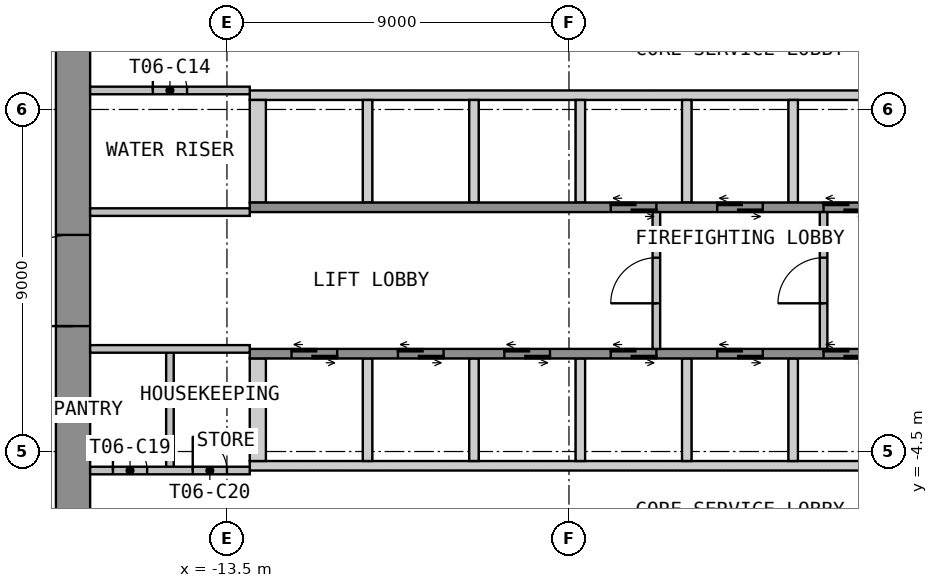
"""IFC4 building model, lengths in metres.
Left out: names, types, materials, properties, quantities, classifications, styles, units other than length and angle.
Written with IfcOpenShell. Run it as: python <this file> out.ifc"""

import sys

from ifc_helpers import new_model, si_unit, direction, frame, frame_2d, origin, place, context, subcontext, project, spatial, polyline, rectangle, outline, extrude, element, fill, save


model = new_model("IFC4")
c1 = context("Model", 3, precision=1e-05, world=origin(), true_north=direction((0.0, 1.0)))
c2 = subcontext(c1, "Body", "Model", "MODEL_VIEW")
j1 = project(units=[si_unit("LENGTHUNIT", "METRE"), si_unit("PLANEANGLEUNIT", "RADIAN")], contexts=[c1])
p1 = place(None, origin())
s1 = spatial("IfcSite", under=j1, at=p1, CompositionType="ELEMENT")
p2 = place(p1, origin())
s2 = spatial("IfcBuilding", under=s1, at=p2, CompositionType="ELEMENT")
p3 = place(p2, frame((0.0, 0.0, 93.0)))
s3 = spatial("IfcBuildingStorey", under=s2, at=p3, CompositionType="ELEMENT", Elevation=93.0)
p4 = place(p3, frame((-17.55, -12.6, 0.0), z_axis=(0.0, 0.0, 1.0), x_axis=(0.0, 1.0, 0.0)))
e1 = element("IfcWall", 1, at=p4, inside=s3, PredefinedType="SHEAR", context=c2, shape_type="SweptSolid", body=[
    extrude(rectangle(XDim=25.2, YDim=0.9, at=frame_2d((12.6, 0.0))), origin(), (0.0, 0.0, 1.0), 3.525),
])
p5 = place(p4, frame((11.4, 0.0, 0.0)))
e2 = element("IfcOpeningElement", 2, at=p5, cuts=e1, PredefinedType="OPENING", context=c2, shape_type="SweptSolid", body=[
    extrude(rectangle(XDim=2.4, YDim=2.1, at=frame_2d((1.2, 1.05))), frame((0.0, 0.46, 0.0), z_axis=(0.0, -1.0, 0.0), x_axis=(1.0, 0.0, 0.0)), (0.0, 0.0, 1.0), 0.92),
])
p6 = place(p3, origin())
e3 = element("IfcWall", 3, at=p6, inside=s3, PredefinedType="SHEAR", context=c2, shape_type="SweptSolid", body=[
    extrude(outline(polyline([(-12.9, 4.75), (12.9, 4.75), (12.9, 5.0), (-12.9, 5.0), (-12.9, 4.75)])), origin(), (0.0, 0.0, 1.0), 3.525),
])
p7 = place(p3, origin())
e4 = element("IfcWall", 4, at=p7, inside=s3, PredefinedType="SHEAR", context=c2, shape_type="SweptSolid", body=[
    extrude(outline(polyline([(-12.9, 2.05), (-12.475, 2.05), (-12.475, 4.75), (-12.9, 4.75), (-12.9, 2.05)])), origin(), (0.0, 0.0, 1.0), 3.525),
])
p8 = place(p3, origin())
e5 = element("IfcWall", 5, at=p8, inside=s3, PredefinedType="SHEAR", context=c2, shape_type="SweptSolid", body=[
    extrude(outline(polyline([(-9.925, 2.05), (-9.675, 2.05), (-9.675, 4.75), (-9.925, 4.75), (-9.925, 2.05)])), origin(), (0.0, 0.0, 1.0), 3.525),
])
p9 = place(p3, origin())
e6 = element("IfcWall", 6, at=p9, inside=s3, PredefinedType="SHEAR", context=c2, shape_type="SweptSolid", body=[
    extrude(outline(polyline([(-7.125, 2.05), (-6.875, 2.05), (-6.875, 4.75), (-7.125, 4.75), (-7.125, 2.05)])), origin(), (0.0, 0.0, 1.0), 3.525),
])
p10 = place(p3, origin())
e7 = element("IfcWall", 7, at=p10, inside=s3, PredefinedType="SHEAR", context=c2, shape_type="SweptSolid", body=[
    extrude(outline(polyline([(-4.325, 2.05), (-4.075, 2.05), (-4.075, 4.75), (-4.325, 4.75), (-4.325, 2.05)])), origin(), (0.0, 0.0, 1.0), 3.525),
])
p11 = place(p3, origin())
e8 = element("IfcWall", 8, at=p11, inside=s3, PredefinedType="SHEAR", context=c2, shape_type="SweptSolid", body=[
    extrude(outline(polyline([(-1.525, 2.05), (-1.275, 2.05), (-1.275, 4.75), (-1.525, 4.75), (-1.525, 2.05)])), origin(), (0.0, 0.0, 1.0), 3.525),
])
p12 = place(p3, origin())
e9 = element("IfcWall", 9, at=p12, inside=s3, PredefinedType="SHEAR", context=c2, shape_type="SweptSolid", body=[
    extrude(outline(polyline([(1.275, 2.05), (1.525, 2.05), (1.525, 4.75), (1.275, 4.75), (1.275, 2.05)])), origin(), (0.0, 0.0, 1.0), 3.525),
])
p13 = place(p3, frame((-12.9, 1.925, 0.0), z_axis=(0.0, 0.0, 1.0), x_axis=(1.0, 0.0, 0.0)))
e10 = element("IfcWall", 10, at=p13, inside=s3, PredefinedType="SHEAR", context=c2, shape_type="SweptSolid", body=[
    extrude(rectangle(XDim=25.8, YDim=0.25, at=frame_2d((12.9, 0.0))), origin(), (0.0, 0.0, 1.0), 3.525),
])
p14 = place(p13, frame((9.5, 0.0, 0.0)))
e11 = element("IfcOpeningElement", 11, at=p14, cuts=e10, PredefinedType="OPENING", context=c2, shape_type="SweptSolid", body=[
    extrude(rectangle(XDim=1.2, YDim=2.1, at=frame_2d((0.6, 1.05))), frame((0.0, 0.135, 0.0), z_axis=(0.0, -1.0, 0.0), x_axis=(1.0, 0.0, 0.0)), (0.0, 0.0, 1.0), 0.27),
])
p15 = place(p13, frame((12.3, 0.0, 0.0)))
e12 = element("IfcOpeningElement", 12, at=p15, cuts=e10, PredefinedType="OPENING", context=c2, shape_type="SweptSolid", body=[
    extrude(rectangle(XDim=1.2, YDim=2.1, at=frame_2d((0.6, 1.05))), frame((0.0, 0.135, 0.0), z_axis=(0.0, -1.0, 0.0), x_axis=(1.0, 0.0, 0.0)), (0.0, 0.0, 1.0), 0.27),
])
p16 = place(p13, frame((15.1, 0.0, 0.0)))
e13 = element("IfcOpeningElement", 13, at=p16, cuts=e10, PredefinedType="OPENING", context=c2, shape_type="SweptSolid", body=[
    extrude(rectangle(XDim=1.2, YDim=2.1, at=frame_2d((0.6, 1.05))), frame((0.0, 0.135, 0.0), z_axis=(0.0, -1.0, 0.0), x_axis=(1.0, 0.0, 0.0)), (0.0, 0.0, 1.0), 0.27),
])
p17 = place(p13, frame((17.9, 0.0, 0.0)))
e14 = element("IfcOpeningElement", 14, at=p17, cuts=e10, PredefinedType="OPENING", context=c2, shape_type="SweptSolid", body=[
    extrude(rectangle(XDim=1.2, YDim=2.1, at=frame_2d((0.6, 1.05))), frame((0.0, 0.135, 0.0), z_axis=(0.0, -1.0, 0.0), x_axis=(1.0, 0.0, 0.0)), (0.0, 0.0, 1.0), 0.27),
])
p18 = place(p13, frame((20.7, 0.0, 0.0)))
e15 = element("IfcOpeningElement", 15, at=p18, cuts=e10, PredefinedType="OPENING", context=c2, shape_type="SweptSolid", body=[
    extrude(rectangle(XDim=1.2, YDim=2.1, at=frame_2d((0.6, 1.05))), frame((0.0, 0.135, 0.0), z_axis=(0.0, -1.0, 0.0), x_axis=(1.0, 0.0, 0.0)), (0.0, 0.0, 1.0), 0.27),
])
p19 = place(p13, frame((23.5, 0.0, 0.0)))
e16 = element("IfcOpeningElement", 16, at=p19, cuts=e10, PredefinedType="OPENING", context=c2, shape_type="SweptSolid", body=[
    extrude(rectangle(XDim=1.2, YDim=2.1, at=frame_2d((0.6, 1.05))), frame((0.0, 0.135, 0.0), z_axis=(0.0, -1.0, 0.0), x_axis=(1.0, 0.0, 0.0)), (0.0, 0.0, 1.0), 0.27),
])
p20 = place(p3, origin())
e17 = element("IfcWall", 17, at=p20, inside=s3, PredefinedType="SHEAR", context=c2, shape_type="SweptSolid", body=[
    extrude(outline(polyline([(-12.9, -5.0), (12.9, -5.0), (12.9, -4.75), (-12.9, -4.75), (-12.9, -5.0)])), origin(), (0.0, 0.0, 1.0), 3.525),
])
p21 = place(p3, origin())
e18 = element("IfcWall", 18, at=p21, inside=s3, PredefinedType="SHEAR", context=c2, shape_type="SweptSolid", body=[
    extrude(outline(polyline([(-12.9, -4.75), (-12.475, -4.75), (-12.475, -2.05), (-12.9, -2.05), (-12.9, -4.75)])), origin(), (0.0, 0.0, 1.0), 3.525),
])
p22 = place(p3, origin())
e19 = element("IfcWall", 19, at=p22, inside=s3, PredefinedType="SHEAR", context=c2, shape_type="SweptSolid", body=[
    extrude(outline(polyline([(-9.925, -4.75), (-9.675, -4.75), (-9.675, -2.05), (-9.925, -2.05), (-9.925, -4.75)])), origin(), (0.0, 0.0, 1.0), 3.525),
])
p23 = place(p3, origin())
e20 = element("IfcWall", 20, at=p23, inside=s3, PredefinedType="SHEAR", context=c2, shape_type="SweptSolid", body=[
    extrude(outline(polyline([(-7.125, -4.75), (-6.875, -4.75), (-6.875, -2.05), (-7.125, -2.05), (-7.125, -4.75)])), origin(), (0.0, 0.0, 1.0), 3.525),
])
p24 = place(p3, origin())
e21 = element("IfcWall", 21, at=p24, inside=s3, PredefinedType="SHEAR", context=c2, shape_type="SweptSolid", body=[
    extrude(outline(polyline([(-4.325, -4.75), (-4.075, -4.75), (-4.075, -2.05), (-4.325, -2.05), (-4.325, -4.75)])), origin(), (0.0, 0.0, 1.0), 3.525),
])
p25 = place(p3, origin())
e22 = element("IfcWall", 22, at=p25, inside=s3, PredefinedType="SHEAR", context=c2, shape_type="SweptSolid", body=[
    extrude(outline(polyline([(-1.525, -4.75), (-1.275, -4.75), (-1.275, -2.05), (-1.525, -2.05), (-1.525, -4.75)])), origin(), (0.0, 0.0, 1.0), 3.525),
])
p26 = place(p3, origin())
e23 = element("IfcWall", 23, at=p26, inside=s3, PredefinedType="SHEAR", context=c2, shape_type="SweptSolid", body=[
    extrude(outline(polyline([(1.275, -4.75), (1.525, -4.75), (1.525, -2.05), (1.275, -2.05), (1.275, -4.75)])), origin(), (0.0, 0.0, 1.0), 3.525),
])
p27 = place(p3, frame((-12.9, -1.925, 0.0), z_axis=(0.0, 0.0, 1.0), x_axis=(1.0, 0.0, 0.0)))
e24 = element("IfcWall", 24, at=p27, inside=s3, PredefinedType="SHEAR", context=c2, shape_type="SweptSolid", body=[
    extrude(rectangle(XDim=25.8, YDim=0.25, at=frame_2d((12.9, 0.0))), origin(), (0.0, 0.0, 1.0), 3.525),
])
p28 = place(p27, frame((1.1, 0.0, 0.0)))
e25 = element("IfcOpeningElement", 25, at=p28, cuts=e24, PredefinedType="OPENING", context=c2, shape_type="SweptSolid", body=[
    extrude(rectangle(XDim=1.2, YDim=2.1, at=frame_2d((0.6, 1.05))), frame((0.0, 0.135, 0.0), z_axis=(0.0, -1.0, 0.0), x_axis=(1.0, 0.0, 0.0)), (0.0, 0.0, 1.0), 0.27),
])
p29 = place(p27, frame((3.9, 0.0, 0.0)))
e26 = element("IfcOpeningElement", 26, at=p29, cuts=e24, PredefinedType="OPENING", context=c2, shape_type="SweptSolid", body=[
    extrude(rectangle(XDim=1.2, YDim=2.1, at=frame_2d((0.6, 1.05))), frame((0.0, 0.135, 0.0), z_axis=(0.0, -1.0, 0.0), x_axis=(1.0, 0.0, 0.0)), (0.0, 0.0, 1.0), 0.27),
])
p30 = place(p27, frame((6.7, 0.0, 0.0)))
e27 = element("IfcOpeningElement", 27, at=p30, cuts=e24, PredefinedType="OPENING", context=c2, shape_type="SweptSolid", body=[
    extrude(rectangle(XDim=1.2, YDim=2.1, at=frame_2d((0.6, 1.05))), frame((0.0, 0.135, 0.0), z_axis=(0.0, -1.0, 0.0), x_axis=(1.0, 0.0, 0.0)), (0.0, 0.0, 1.0), 0.27),
])
p31 = place(p27, frame((9.5, 0.0, 0.0)))
e28 = element("IfcOpeningElement", 28, at=p31, cuts=e24, PredefinedType="OPENING", context=c2, shape_type="SweptSolid", body=[
    extrude(rectangle(XDim=1.2, YDim=2.1, at=frame_2d((0.6, 1.05))), frame((0.0, 0.135, 0.0), z_axis=(0.0, -1.0, 0.0), x_axis=(1.0, 0.0, 0.0)), (0.0, 0.0, 1.0), 0.27),
])
p32 = place(p27, frame((12.3, 0.0, 0.0)))
e29 = element("IfcOpeningElement", 29, at=p32, cuts=e24, PredefinedType="OPENING", context=c2, shape_type="SweptSolid", body=[
    extrude(rectangle(XDim=1.2, YDim=2.1, at=frame_2d((0.6, 1.05))), frame((0.0, 0.135, 0.0), z_axis=(0.0, -1.0, 0.0), x_axis=(1.0, 0.0, 0.0)), (0.0, 0.0, 1.0), 0.27),
])
p33 = place(p27, frame((15.1, 0.0, 0.0)))
e30 = element("IfcOpeningElement", 30, at=p33, cuts=e24, PredefinedType="OPENING", context=c2, shape_type="SweptSolid", body=[
    extrude(rectangle(XDim=1.2, YDim=2.1, at=frame_2d((0.6, 1.05))), frame((0.0, 0.135, 0.0), z_axis=(0.0, -1.0, 0.0), x_axis=(1.0, 0.0, 0.0)), (0.0, 0.0, 1.0), 0.27),
])
p34 = place(p3, frame((-2.2, -1.8, 0.0), z_axis=(0.0, 0.0, 1.0), x_axis=(0.0, 1.0, 0.0)))
e31 = element("IfcWall", 31, at=p34, inside=s3, PredefinedType="PARTITIONING", context=c2, shape_type="SweptSolid", body=[
    extrude(rectangle(XDim=3.6, YDim=0.2, at=frame_2d((1.8, 0.0))), origin(), (0.0, 0.0, 1.0), 3.525),
])
p35 = place(p34, frame((1.2, 0.0, 0.0)))
e32 = element("IfcOpeningElement", 32, at=p35, cuts=e31, PredefinedType="OPENING", context=c2, shape_type="SweptSolid", body=[
    extrude(rectangle(XDim=1.2, YDim=2.1, at=frame_2d((0.6, 1.05))), frame((0.0, 0.11, 0.0), z_axis=(0.0, -1.0, 0.0), x_axis=(1.0, 0.0, 0.0)), (0.0, 0.0, 1.0), 0.22),
])
p36 = place(p3, frame((2.2, -1.8, 0.0), z_axis=(0.0, 0.0, 1.0), x_axis=(0.0, 1.0, 0.0)))
e33 = element("IfcWall", 33, at=p36, inside=s3, PredefinedType="PARTITIONING", context=c2, shape_type="SweptSolid", body=[
    extrude(rectangle(XDim=3.6, YDim=0.2, at=frame_2d((1.8, 0.0))), origin(), (0.0, 0.0, 1.0), 3.525),
])
p37 = place(p36, frame((1.2, 0.0, 0.0)))
e34 = element("IfcOpeningElement", 34, at=p37, cuts=e33, PredefinedType="OPENING", context=c2, shape_type="SweptSolid", body=[
    extrude(rectangle(XDim=1.2, YDim=2.1, at=frame_2d((0.6, 1.05))), frame((0.0, 0.11, 0.0), z_axis=(0.0, -1.0, 0.0), x_axis=(1.0, 0.0, 0.0)), (0.0, 0.0, 1.0), 0.22),
])
p38 = place(p3, frame((-17.1, 5.0, 0.0), z_axis=(0.0, 0.0, 1.0), x_axis=(1.0, 0.0, 0.0)))
e35 = element("IfcWall", 35, at=p38, inside=s3, PredefinedType="PARTITIONING", context=c2, shape_type="SweptSolid", body=[
    extrude(rectangle(XDim=4.2, YDim=0.2, at=frame_2d((2.1, 0.0))), origin(), (0.0, 0.0, 1.0), 3.525),
])
p39 = place(p38, frame((1.65, 0.0, 0.0)))
e36 = element("IfcOpeningElement", 36, at=p39, cuts=e35, PredefinedType="OPENING", context=c2, shape_type="SweptSolid", body=[
    extrude(rectangle(XDim=0.9, YDim=2.1, at=frame_2d((0.45, 1.05))), frame((0.0, 0.11, 0.0), z_axis=(0.0, -1.0, 0.0), x_axis=(1.0, 0.0, 0.0)), (0.0, 0.0, 1.0), 0.22),
])
p40 = place(p3, frame((-17.1, 1.8, 0.0), z_axis=(0.0, 0.0, 1.0), x_axis=(1.0, 0.0, 0.0)))
e37 = element("IfcWall", 37, at=p40, inside=s3, PredefinedType="PARTITIONING", context=c2, shape_type="SweptSolid", body=[
    extrude(rectangle(XDim=4.2, YDim=0.2, at=frame_2d((2.1, 0.0))), origin(), (0.0, 0.0, 1.0), 3.525),
])
p41 = place(p3, frame((-15.0, -5.0, 0.0), z_axis=(0.0, 0.0, 1.0), x_axis=(0.0, 1.0, 0.0)))
e38 = element("IfcWall", 38, at=p41, inside=s3, PredefinedType="PARTITIONING", context=c2, shape_type="SweptSolid", body=[
    extrude(rectangle(XDim=3.2, YDim=0.2, at=frame_2d((1.6, 0.0))), origin(), (0.0, 0.0, 1.0), 3.525),
])
p42 = place(p3, frame((-17.1, -5.0, 0.0), z_axis=(0.0, 0.0, 1.0), x_axis=(1.0, 0.0, 0.0)))
e39 = element("IfcWall", 39, at=p42, inside=s3, PredefinedType="PARTITIONING", context=c2, shape_type="SweptSolid", body=[
    extrude(rectangle(XDim=4.2, YDim=0.2, at=frame_2d((2.1, 0.0))), origin(), (0.0, 0.0, 1.0), 3.525),
])
p43 = place(p42, frame((0.6, 0.0, 0.0)))
e40 = element("IfcOpeningElement", 40, at=p43, cuts=e39, PredefinedType="OPENING", context=c2, shape_type="SweptSolid", body=[
    extrude(rectangle(XDim=0.9, YDim=2.1, at=frame_2d((0.45, 1.05))), frame((0.0, 0.11, 0.0), z_axis=(0.0, -1.0, 0.0), x_axis=(1.0, 0.0, 0.0)), (0.0, 0.0, 1.0), 0.22),
])
p44 = place(p42, frame((2.7, 0.0, 0.0)))
e41 = element("IfcOpeningElement", 41, at=p44, cuts=e39, PredefinedType="OPENING", context=c2, shape_type="SweptSolid", body=[
    extrude(rectangle(XDim=0.9, YDim=2.1, at=frame_2d((0.45, 1.05))), frame((0.0, 0.11, 0.0), z_axis=(0.0, -1.0, 0.0), x_axis=(1.0, 0.0, 0.0)), (0.0, 0.0, 1.0), 0.22),
])
p45 = place(p3, frame((-17.1, -1.8, 0.0), z_axis=(0.0, 0.0, 1.0), x_axis=(1.0, 0.0, 0.0)))
e42 = element("IfcWall", 42, at=p45, inside=s3, PredefinedType="PARTITIONING", context=c2, shape_type="SweptSolid", body=[
    extrude(rectangle(XDim=4.2, YDim=0.2, at=frame_2d((2.1, 0.0))), origin(), (0.0, 0.0, 1.0), 3.525),
])
p46 = place(p5, origin())
e43 = element("IfcDoor", 43, at=p46, inside=s3, OperationType="DOUBLE_DOOR_DOUBLE_SWING", PredefinedType="DOOR", context=c2, shape_type="SweptSolid", body=[
    extrude(rectangle(XDim=2.4, YDim=2.1, at=frame_2d((1.2, 1.05))), frame((0.0, 0.025, 0.0), z_axis=(0.0, -1.0, 0.0), x_axis=(1.0, 0.0, 0.0)), (0.0, 0.0, 1.0), 0.05),
])
fill(e2, e43)
p47 = place(p14, origin())
e44 = element("IfcDoor", 44, at=p47, inside=s3, OperationType="DOUBLE_DOOR_SLIDING", PredefinedType="DOOR", context=c2, shape_type="SweptSolid", body=[
    extrude(rectangle(XDim=1.2, YDim=2.1, at=frame_2d((0.6, 1.05))), frame((0.0, 0.025, 0.0), z_axis=(0.0, -1.0, 0.0), x_axis=(1.0, 0.0, 0.0)), (0.0, 0.0, 1.0), 0.05),
])
fill(e11, e44)
p48 = place(p15, origin())
e45 = element("IfcDoor", 45, at=p48, inside=s3, OperationType="DOUBLE_DOOR_SLIDING", PredefinedType="DOOR", context=c2, shape_type="SweptSolid", body=[
    extrude(rectangle(XDim=1.2, YDim=2.1, at=frame_2d((0.6, 1.05))), frame((0.0, 0.025, 0.0), z_axis=(0.0, -1.0, 0.0), x_axis=(1.0, 0.0, 0.0)), (0.0, 0.0, 1.0), 0.05),
])
fill(e12, e45)
p49 = place(p16, origin())
e46 = element("IfcDoor", 46, at=p49, inside=s3, OperationType="DOUBLE_DOOR_SLIDING", PredefinedType="DOOR", context=c2, shape_type="SweptSolid", body=[
    extrude(rectangle(XDim=1.2, YDim=2.1, at=frame_2d((0.6, 1.05))), frame((0.0, 0.025, 0.0), z_axis=(0.0, -1.0, 0.0), x_axis=(1.0, 0.0, 0.0)), (0.0, 0.0, 1.0), 0.05),
])
fill(e13, e46)
p50 = place(p28, origin())
e47 = element("IfcDoor", 47, at=p50, inside=s3, OperationType="DOUBLE_DOOR_SLIDING", PredefinedType="DOOR", context=c2, shape_type="SweptSolid", body=[
    extrude(rectangle(XDim=1.2, YDim=2.1, at=frame_2d((0.6, 1.05))), frame((0.0, 0.025, 0.0), z_axis=(0.0, -1.0, 0.0), x_axis=(1.0, 0.0, 0.0)), (0.0, 0.0, 1.0), 0.05),
])
fill(e25, e47)
p51 = place(p29, origin())
e48 = element("IfcDoor", 48, at=p51, inside=s3, OperationType="DOUBLE_DOOR_SLIDING", PredefinedType="DOOR", context=c2, shape_type="SweptSolid", body=[
    extrude(rectangle(XDim=1.2, YDim=2.1, at=frame_2d((0.6, 1.05))), frame((0.0, 0.025, 0.0), z_axis=(0.0, -1.0, 0.0), x_axis=(1.0, 0.0, 0.0)), (0.0, 0.0, 1.0), 0.05),
])
fill(e26, e48)
p52 = place(p30, origin())
e49 = element("IfcDoor", 49, at=p52, inside=s3, OperationType="DOUBLE_DOOR_SLIDING", PredefinedType="DOOR", context=c2, shape_type="SweptSolid", body=[
    extrude(rectangle(XDim=1.2, YDim=2.1, at=frame_2d((0.6, 1.05))), frame((0.0, 0.025, 0.0), z_axis=(0.0, -1.0, 0.0), x_axis=(1.0, 0.0, 0.0)), (0.0, 0.0, 1.0), 0.05),
])
fill(e27, e49)
p53 = place(p31, origin())
e50 = element("IfcDoor", 50, at=p53, inside=s3, OperationType="DOUBLE_DOOR_SLIDING", PredefinedType="DOOR", context=c2, shape_type="SweptSolid", body=[
    extrude(rectangle(XDim=1.2, YDim=2.1, at=frame_2d((0.6, 1.05))), frame((0.0, 0.025, 0.0), z_axis=(0.0, -1.0, 0.0), x_axis=(1.0, 0.0, 0.0)), (0.0, 0.0, 1.0), 0.05),
])
fill(e28, e50)
p54 = place(p32, origin())
e51 = element("IfcDoor", 51, at=p54, inside=s3, OperationType="DOUBLE_DOOR_SLIDING", PredefinedType="DOOR", context=c2, shape_type="SweptSolid", body=[
    extrude(rectangle(XDim=1.2, YDim=2.1, at=frame_2d((0.6, 1.05))), frame((0.0, 0.025, 0.0), z_axis=(0.0, -1.0, 0.0), x_axis=(1.0, 0.0, 0.0)), (0.0, 0.0, 1.0), 0.05),
])
fill(e29, e51)
p55 = place(p33, origin())
e52 = element("IfcDoor", 52, at=p55, inside=s3, OperationType="DOUBLE_DOOR_SLIDING", PredefinedType="DOOR", context=c2, shape_type="SweptSolid", body=[
    extrude(rectangle(XDim=1.2, YDim=2.1, at=frame_2d((0.6, 1.05))), frame((0.0, 0.025, 0.0), z_axis=(0.0, -1.0, 0.0), x_axis=(1.0, 0.0, 0.0)), (0.0, 0.0, 1.0), 0.05),
])
fill(e30, e52)
p56 = place(p35, origin())
e53 = element("IfcDoor", 53, at=p56, inside=s3, OperationType="SINGLE_SWING_LEFT", PredefinedType="DOOR", context=c2, shape_type="SweptSolid", body=[
    extrude(rectangle(XDim=1.2, YDim=2.1, at=frame_2d((0.6, 1.05))), frame((0.0, 0.025, 0.0), z_axis=(0.0, -1.0, 0.0), x_axis=(1.0, 0.0, 0.0)), (0.0, 0.0, 1.0), 0.05),
])
fill(e32, e53)
p57 = place(p37, origin())
e54 = element("IfcDoor", 54, at=p57, inside=s3, OperationType="SINGLE_SWING_LEFT", PredefinedType="DOOR", context=c2, shape_type="SweptSolid", body=[
    extrude(rectangle(XDim=1.2, YDim=2.1, at=frame_2d((0.6, 1.05))), frame((0.0, 0.025, 0.0), z_axis=(0.0, -1.0, 0.0), x_axis=(1.0, 0.0, 0.0)), (0.0, 0.0, 1.0), 0.05),
])
fill(e34, e54)
p58 = place(p39, origin())
e55 = element("IfcDoor", 55, at=p58, inside=s3, OperationType="SINGLE_SWING_LEFT", PredefinedType="DOOR", context=c2, shape_type="SweptSolid", body=[
    extrude(rectangle(XDim=0.9, YDim=2.1, at=frame_2d((0.45, 1.05))), frame((0.0, 0.025, 0.0), z_axis=(0.0, -1.0, 0.0), x_axis=(1.0, 0.0, 0.0)), (0.0, 0.0, 1.0), 0.05),
])
fill(e36, e55)
p59 = place(p43, origin())
e56 = element("IfcDoor", 56, at=p59, inside=s3, OperationType="SINGLE_SWING_LEFT", PredefinedType="DOOR", context=c2, shape_type="SweptSolid", body=[
    extrude(rectangle(XDim=0.9, YDim=2.1, at=frame_2d((0.45, 1.05))), frame((0.0, 0.025, 0.0), z_axis=(0.0, -1.0, 0.0), x_axis=(1.0, 0.0, 0.0)), (0.0, 0.0, 1.0), 0.05),
])
fill(e40, e56)
p60 = place(p44, origin())
e57 = element("IfcDoor", 57, at=p60, inside=s3, OperationType="SINGLE_SWING_LEFT", PredefinedType="DOOR", context=c2, shape_type="SweptSolid", body=[
    extrude(rectangle(XDim=0.9, YDim=2.1, at=frame_2d((0.45, 1.05))), frame((0.0, 0.025, 0.0), z_axis=(0.0, -1.0, 0.0), x_axis=(1.0, 0.0, 0.0)), (0.0, 0.0, 1.0), 0.05),
])
fill(e41, e57)
save(model, sys.argv[1])
